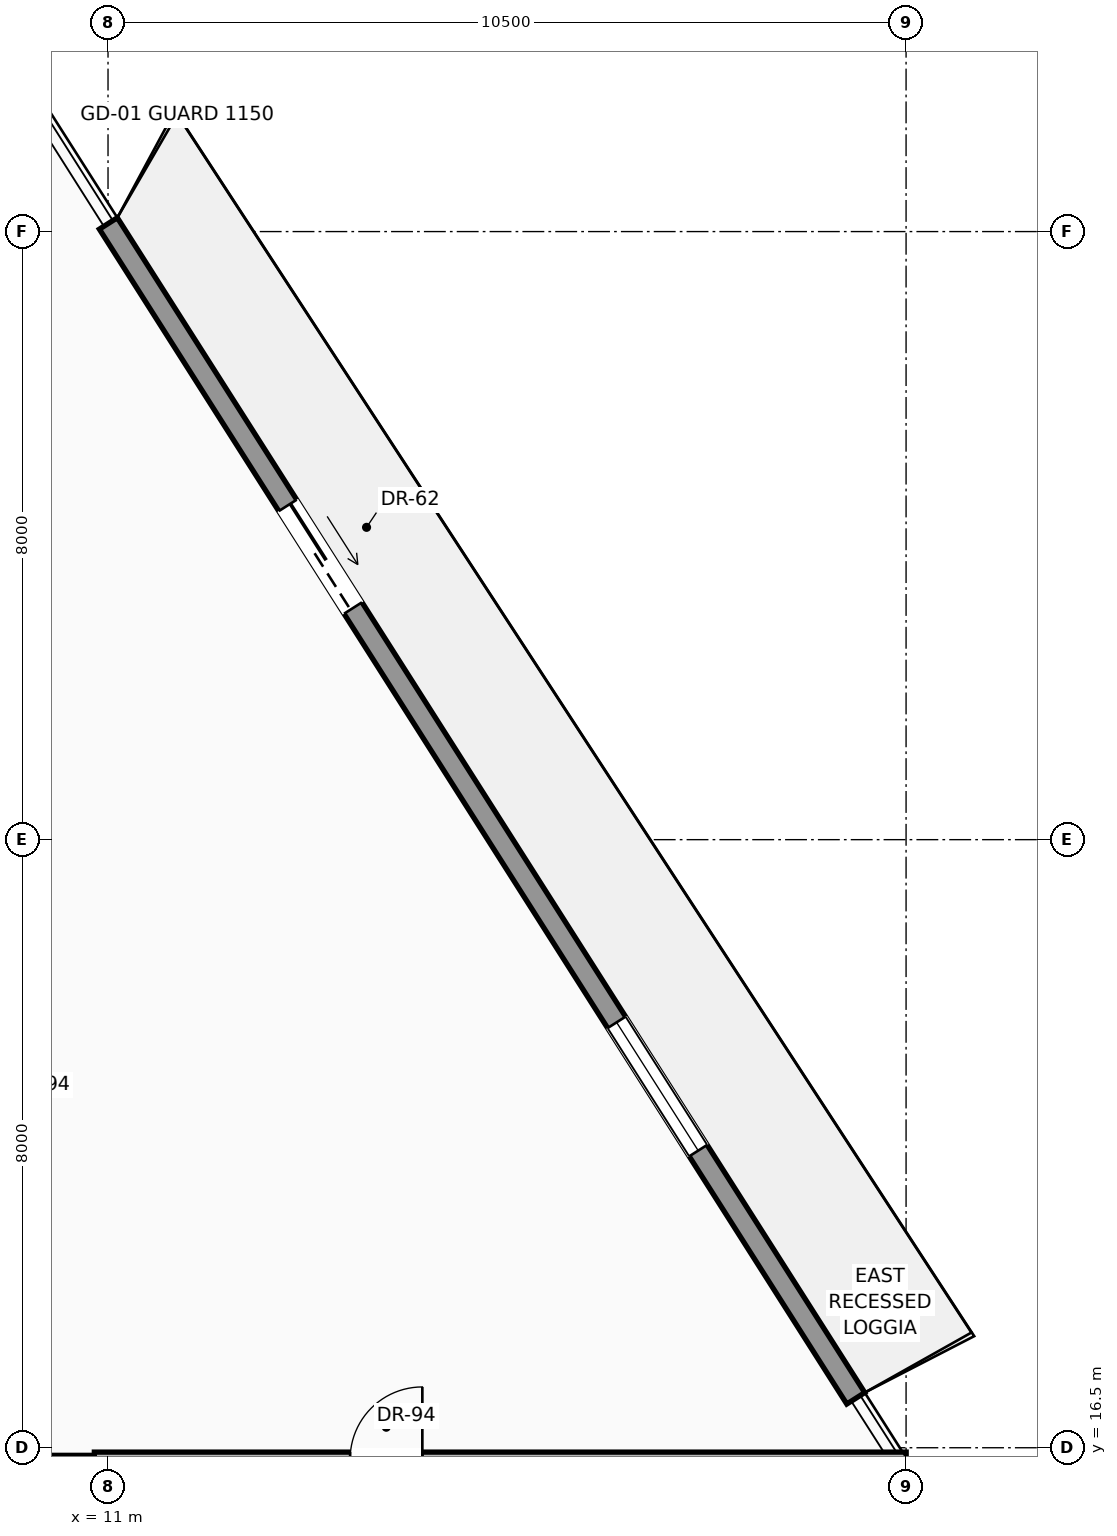
"""IFC4 building model, lengths in metres.
Left out: names, types, materials, properties, quantities, classifications, styles, units other than length and angle.
Written with IfcOpenShell. Run it as: python <this file> out.ifc"""

import sys

from ifc_helpers import new_model, si_unit, direction, frame, frame_2d, origin, place, context, subcontext, project, spatial, rectangle, extrude, source, transform, mapped, element, fill, save


model = new_model("IFC4")
c1 = context("Model", 3, precision=1e-05, world=origin(), true_north=direction((0.0, 1.0)))
c2 = subcontext(c1, "Body", "Model", "MODEL_VIEW")
j1 = project(units=[si_unit("LENGTHUNIT", "METRE"), si_unit("PLANEANGLEUNIT", "RADIAN")], contexts=[c1])
p1 = place(None, origin())
s1 = spatial("IfcSite", under=j1, at=p1, CompositionType="ELEMENT")
p2 = place(p1, origin())
s2 = spatial("IfcBuilding", under=s1, at=p2, CompositionType="ELEMENT")
p3 = place(p2, frame((0.0, 0.0, 151.5)))
s3 = spatial("IfcBuildingStorey", under=s2, at=p3, CompositionType="ELEMENT", Elevation=151.5)
p4 = place(p3, frame((-10.8, 16.075, 0.0), z_axis=(0.0, 0.0, 1.0), x_axis=(1.0, 0.0, 0.0)))
e1 = element("IfcWall", 1, at=p4, inside=s3, PredefinedType="SHEAR", context=c2, shape_type="SweptSolid", body=[
    extrude(rectangle(XDim=21.6, YDim=0.65, at=frame_2d((10.8, 0.0))), origin(), (0.0, 0.0, 1.0), 3.47),
])
p5 = place(p4, frame((3.37, 0.0, 0.0)))
e2 = element("IfcOpeningElement", 2, at=p5, cuts=e1, PredefinedType="OPENING", context=c2, shape_type="SweptSolid", body=[
    extrude(rectangle(XDim=1.3, YDim=2.3, at=frame_2d((0.65, 1.15))), frame((0.0, 0.335, 0.0), z_axis=(0.0, -1.0, 0.0), x_axis=(1.0, 0.0, 0.0)), (0.0, 0.0, 1.0), 0.67),
])
p6 = place(p4, frame((9.8, 0.0, 0.0)))
e3 = element("IfcOpeningElement", 3, at=p6, cuts=e1, PredefinedType="OPENING", context=c2, shape_type="SweptSolid", body=[
    extrude(rectangle(XDim=2.0, YDim=2.4, at=frame_2d((1.0, 1.2))), frame((0.0, 0.335, 0.0), z_axis=(0.0, -1.0, 0.0), x_axis=(1.0, 0.0, 0.0)), (0.0, 0.0, 1.0), 0.67),
])
p7 = place(p3, frame((11.004, 32.607, 0.0), z_axis=(0.0, 0.0, 1.0), x_axis=(0.536776323973, -0.843724586593, 0.0)))
e4 = element("IfcWall", 4, at=p7, inside=s3, PredefinedType="SOLIDWALL", context=c2, shape_type="SweptSolid", body=[
    extrude(rectangle(XDim=18.32, YDim=0.28, at=frame_2d((9.16, 0.0))), origin(), (0.0, 0.0, 1.0), 3.05),
])
p8 = place(p7, frame((4.397, 0.0, 0.0)))
e5 = element("IfcOpeningElement", 5, at=p8, cuts=e4, PredefinedType="OPENING", context=c2, shape_type="SweptSolid", body=[
    extrude(rectangle(XDim=1.6, YDim=2.35, at=frame_2d((0.8, 1.175))), frame((0.0, 0.15, 0.0), z_axis=(0.0, -1.0, 0.0), x_axis=(1.0, 0.0, 0.0)), (0.0, 0.0, 1.0), 0.3),
])
p9 = place(p7, frame((12.458, 0.0, 0.9)))
e6 = element("IfcOpeningElement", 6, at=p9, cuts=e4, PredefinedType="OPENING", context=c2, shape_type="SweptSolid", body=[
    extrude(rectangle(XDim=2.0, YDim=1.85, at=frame_2d((1.0, 0.925))), frame((0.0, 0.15, 0.0), z_axis=(0.0, -1.0, 0.0), x_axis=(1.0, 0.0, 0.0)), (0.0, 0.0, 1.0), 0.3),
])
p10 = place(p3, frame((10.82, 16.35, 0.0), z_axis=(0.0, 0.0, 1.0), x_axis=(1.0, 0.0, 0.0)))
e7 = element("IfcWall", 7, at=p10, inside=s3, PredefinedType="PARTITIONING", context=c2, shape_type="SweptSolid", body=[
    extrude(rectangle(XDim=10.681, YDim=0.185, at=frame_2d((5.341, 0.0))), origin(), (0.0, 0.0, 1.0), 3.462),
])
p11 = place(p10, frame((3.365, 0.0, 0.0)))
e8 = element("IfcOpeningElement", 8, at=p11, cuts=e7, PredefinedType="OPENING", context=c2, shape_type="SweptSolid", body=[
    extrude(rectangle(XDim=0.95, YDim=2.2, at=frame_2d((0.475, 1.1))), frame((0.0, 0.103, 0.0), z_axis=(0.0, -1.0, 0.0), x_axis=(1.0, 0.0, 0.0)), (0.0, 0.0, 1.0), 0.205),
])
m1 = source(origin(), c2, "Body", "SweptSolid", [
    extrude(rectangle(XDim=1.6, YDim=2.35, at=frame_2d((0.8, 1.175))), frame((0.0, 0.025, 0.0), z_axis=(0.0, -1.0, 0.0), x_axis=(1.0, 0.0, 0.0)), (0.0, 0.0, 1.0), 0.05),
])
p12 = place(p8, origin())
e9 = element("IfcDoor", 9, at=p12, inside=s3, OperationType="SLIDING_TO_RIGHT", PredefinedType="DOOR", context=c2, shape_type="MappedRepresentation", body=[
    mapped(m1, transform((0.0, 0.0, 0.0), scale=1.0)),
])
fill(e5, e9)
m2 = source(origin(), c2, "Body", "SweptSolid", [
    extrude(rectangle(XDim=2.0, YDim=1.85, at=frame_2d((1.0, 0.925))), frame((0.0, 0.03, 0.0), z_axis=(0.0, -1.0, 0.0), x_axis=(1.0, 0.0, 0.0)), (0.0, 0.0, 1.0), 0.06),
])
p13 = place(p9, origin())
e10 = element("IfcWindow", 10, at=p13, inside=s3, PartitioningType="SINGLE_PANEL", PredefinedType="WINDOW", context=c2, shape_type="MappedRepresentation", body=[
    mapped(m2, transform((0.0, 0.0, 0.0), scale=1.0)),
])
fill(e6, e10)
save(model, sys.argv[1])
